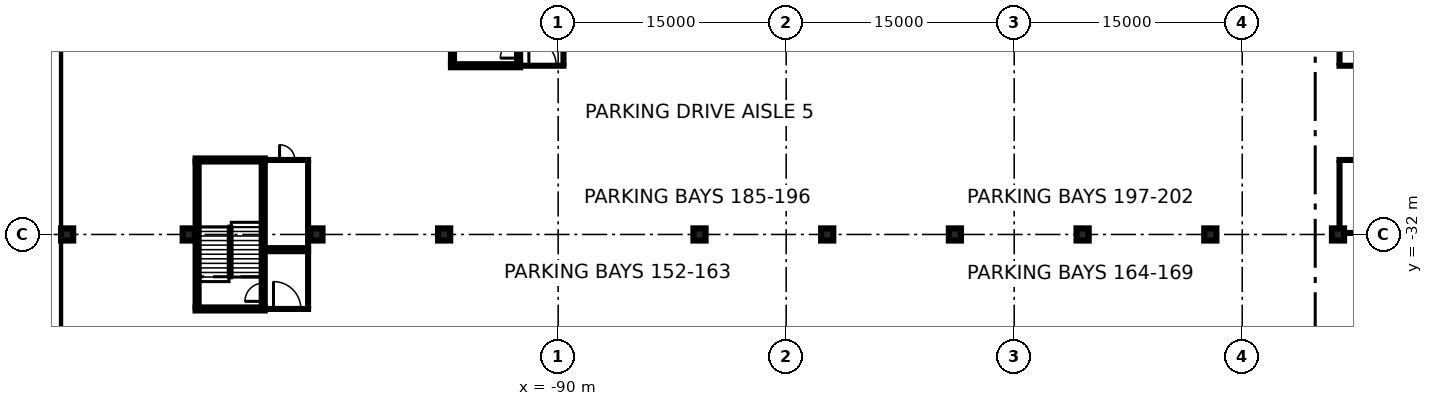
"""IFC4 building model, lengths in metres.
Left out: names, types, materials, properties, quantities, classifications, styles, units other than length and angle.
Written with IfcOpenShell. Run it as: python <this file> out.ifc"""

import sys

from ifc_helpers import new_model, si_unit, direction, frame, frame_2d, origin, origin_2d, place, context, subcontext, project, spatial, rectangle, extrude, element, fill, save


model = new_model("IFC4")
c1 = context("Model", 3, precision=1e-05, world=origin(), true_north=direction((0.0, 1.0)))
c2 = subcontext(c1, "Body", "Model", "MODEL_VIEW")
j1 = project(units=[si_unit("LENGTHUNIT", "METRE"), si_unit("PLANEANGLEUNIT", "RADIAN")], contexts=[c1])
p1 = place(None, origin())
s1 = spatial("IfcSite", under=j1, at=p1, CompositionType="ELEMENT")
p2 = place(p1, origin())
s2 = spatial("IfcBuilding", under=s1, at=p2, CompositionType="ELEMENT")
p3 = place(p2, frame((0.0, 0.0, -12.0)))
s3 = spatial("IfcBuildingStorey", under=s2, at=p3, CompositionType="ELEMENT", Elevation=-12.0)
p4 = place(p3, frame((-123.15, -80.0, 0.0), z_axis=(0.0, 0.0, 1.0), x_axis=(0.0, 1.0, 0.0)))
e1 = element("IfcWall", 1, at=p4, inside=s3, PredefinedType="USERDEFINED", context=c2, shape_type="SweptSolid", body=[
    extrude(rectangle(XDim=160.0, YDim=0.9, at=frame_2d((80.0, 0.0))), origin(), (0.0, 0.0, 1.0), 11.55),
])
p5 = place(p2, frame((0.0, 0.0, -3.6)))
s4 = spatial("IfcBuildingStorey", under=s2, at=p5, CompositionType="ELEMENT", Elevation=-3.6)
for number, where, z_axis, x_axis in (
    (2, (-122.3, -32.0, -0.4), (0.0, 0.0, 1.0), (1.0, 0.0, 0.0)),
    (3, (-114.3, -32.0, -0.4), (0.0, 0.0, 1.0), (1.0, 0.0, 0.0)),
    (4, (-105.9, -32.0, -0.4), (0.0, 0.0, 1.0), (1.0, 0.0, 0.0)),
    (5, (-97.5, -32.0, -0.4), (0.0, 0.0, 1.0), (1.0, 0.0, 0.0)),
    (6, (-80.7, -32.0, -0.4), (0.0, 0.0, 1.0), (1.0, 0.0, 0.0)),
    (7, (-72.3, -32.0, -0.4), (0.0, 0.0, 1.0), (1.0, 0.0, 0.0)),
    (8, (-63.9, -32.0, -0.4), (0.0, 0.0, 1.0), (1.0, 0.0, 0.0)),
    (9, (-55.5, -32.0, -0.4), (0.0, 0.0, 1.0), (1.0, 0.0, 0.0)),
    (10, (-47.1, -32.0, -0.4), (0.0, 0.0, 1.0), (1.0, 0.0, 0.0)),
    (11, (-38.7, -32.0, -0.4), (0.0, 0.0, 1.0), (1.0, 0.0, 0.0)),
):
    element("IfcColumn", number, at=place(p5, frame(where, z_axis=z_axis, x_axis=x_axis)), inside=s4, PredefinedType="COLUMN", context=c2, shape_type="SweptSolid", body=[
        extrude(rectangle(XDim=0.8, YDim=0.8, at=origin_2d()), origin(), (0.0, 0.0, 1.0), 3.55),
    ])
p6 = place(p5, frame((-38.7, -31.9, 0.0), z_axis=(0.0, 0.0, 1.0), x_axis=(1.0, 0.0, 0.0)))
e12 = element("IfcWall", 12, at=p6, inside=s4, PredefinedType="PARTITIONING", context=c2, shape_type="SweptSolid", body=[
    extrude(rectangle(XDim=17.6, YDim=0.2, at=frame_2d((8.8, 0.0))), origin(), (0.0, 0.0, 1.0), 3.15),
])
p7 = place(p5, frame((-38.7, -27.1, 0.0), z_axis=(0.0, 0.0, 1.0), x_axis=(1.0, 0.0, 0.0)))
e13 = element("IfcWall", 13, at=p7, inside=s4, PredefinedType="PARTITIONING", context=c2, shape_type="SweptSolid", body=[
    extrude(rectangle(XDim=17.6, YDim=0.2, at=frame_2d((8.8, 0.0))), origin(), (0.0, 0.0, 1.0), 3.15),
])
p8 = place(p7, frame((8.3, 0.0, 0.0)))
e14 = element("IfcOpeningElement", 14, at=p8, cuts=e13, PredefinedType="OPENING", context=c2, shape_type="SweptSolid", body=[
    extrude(rectangle(XDim=1.0, YDim=2.1, at=frame_2d((0.5, 1.05))), frame((0.0, 0.11, 0.0), z_axis=(0.0, -1.0, 0.0), x_axis=(1.0, 0.0, 0.0)), (0.0, 0.0, 1.0), 0.22),
])
p9 = place(p5, frame((-38.6, -31.6, 0.0), z_axis=(0.0, 0.0, 1.0), x_axis=(0.0, 1.0, 0.0)))
e15 = element("IfcWall", 15, at=p9, inside=s4, PredefinedType="PARTITIONING", context=c2, shape_type="SweptSolid", body=[
    extrude(rectangle(XDim=4.4, YDim=0.2, at=frame_2d((2.2, 0.0))), origin(), (0.0, 0.0, 1.0), 3.15),
])
p10 = place(p5, frame((-38.7, -20.9, 0.0), z_axis=(0.0, 0.0, 1.0), x_axis=(1.0, 0.0, 0.0)))
e16 = element("IfcWall", 16, at=p10, inside=s4, PredefinedType="PARTITIONING", context=c2, shape_type="SweptSolid", body=[
    extrude(rectangle(XDim=33.6, YDim=0.2, at=frame_2d((16.8, 0.0))), origin(), (0.0, 0.0, 1.0), 3.15),
])
p11 = place(p10, frame((15.9, 0.0, 0.0)))
e17 = element("IfcOpeningElement", 17, at=p11, cuts=e16, PredefinedType="OPENING", context=c2, shape_type="SweptSolid", body=[
    extrude(rectangle(XDim=1.8, YDim=2.1, at=frame_2d((0.9, 1.05))), frame((0.0, 0.11, 0.0), z_axis=(0.0, -1.0, 0.0), x_axis=(1.0, 0.0, 0.0)), (0.0, 0.0, 1.0), 0.22),
])
p12 = place(p5, frame((-38.6, -20.8, 0.0), z_axis=(0.0, 0.0, 1.0), x_axis=(0.0, 1.0, 0.0)))
e18 = element("IfcWall", 18, at=p12, inside=s4, PredefinedType="PARTITIONING", context=c2, shape_type="SweptSolid", body=[
    extrude(rectangle(XDim=4.2, YDim=0.2, at=frame_2d((2.1, 0.0))), origin(), (0.0, 0.0, 1.0), 3.15),
])
p13 = place(p5, frame((-109.3, -36.9, 0.0), z_axis=(0.0, 0.0, 1.0), x_axis=(1.0, 0.0, 0.0)))
e19 = element("IfcWall", 19, at=p13, inside=s4, PredefinedType="PARTITIONING", context=c2, shape_type="SweptSolid", body=[
    extrude(rectangle(XDim=2.95, YDim=0.2, at=frame_2d((1.475, 0.0))), origin(), (0.0, 0.0, 1.0), 3.15),
])
p14 = place(p13, frame((0.575, 0.0, 0.0)))
e20 = element("IfcOpeningElement", 20, at=p14, cuts=e19, PredefinedType="OPENING", context=c2, shape_type="SweptSolid", body=[
    extrude(rectangle(XDim=1.8, YDim=2.1, at=frame_2d((0.9, 1.05))), frame((0.0, 0.11, 0.0), z_axis=(0.0, -1.0, 0.0), x_axis=(1.0, 0.0, 0.0)), (0.0, 0.0, 1.0), 0.22),
])
p15 = place(p5, frame((-109.3, -33.1, 0.0), z_axis=(0.0, 0.0, 1.0), x_axis=(1.0, 0.0, 0.0)))
e21 = element("IfcWall", 21, at=p15, inside=s4, PredefinedType="PARTITIONING", context=c2, shape_type="SweptSolid", body=[
    extrude(rectangle(XDim=2.95, YDim=0.2, at=frame_2d((1.475, 0.0))), origin(), (0.0, 0.0, 1.0), 3.15),
])
p16 = place(p5, frame((-106.45, -36.8, 0.0), z_axis=(0.0, 0.0, 1.0), x_axis=(0.0, 1.0, 0.0)))
e22 = element("IfcWall", 22, at=p16, inside=s4, PredefinedType="PARTITIONING", context=c2, shape_type="SweptSolid", body=[
    extrude(rectangle(XDim=3.6, YDim=0.2, at=frame_2d((1.8, 0.0))), origin(), (0.0, 0.0, 1.0), 3.15),
])
p17 = place(p5, frame((-109.3, -32.9, 0.0), z_axis=(0.0, 0.0, 1.0), x_axis=(1.0, 0.0, 0.0)))
e23 = element("IfcWall", 23, at=p17, inside=s4, PredefinedType="PARTITIONING", context=c2, shape_type="SweptSolid", body=[
    extrude(rectangle(XDim=2.95, YDim=0.2, at=frame_2d((1.475, 0.0))), origin(), (0.0, 0.0, 1.0), 3.15),
])
p18 = place(p5, frame((-109.3, -27.1, 0.0), z_axis=(0.0, 0.0, 1.0), x_axis=(1.0, 0.0, 0.0)))
e24 = element("IfcWall", 24, at=p18, inside=s4, PredefinedType="PARTITIONING", context=c2, shape_type="SweptSolid", body=[
    extrude(rectangle(XDim=2.95, YDim=0.2, at=frame_2d((1.475, 0.0))), origin(), (0.0, 0.0, 1.0), 3.15),
])
p19 = place(p18, frame((0.975, 0.0, 0.0)))
e25 = element("IfcOpeningElement", 25, at=p19, cuts=e24, PredefinedType="OPENING", context=c2, shape_type="SweptSolid", body=[
    extrude(rectangle(XDim=1.0, YDim=2.1, at=frame_2d((0.5, 1.05))), frame((0.0, 0.11, 0.0), z_axis=(0.0, -1.0, 0.0), x_axis=(1.0, 0.0, 0.0)), (0.0, 0.0, 1.0), 0.22),
])
p20 = place(p5, frame((-106.45, -32.8, 0.0), z_axis=(0.0, 0.0, 1.0), x_axis=(0.0, 1.0, 0.0)))
e26 = element("IfcWall", 26, at=p20, inside=s4, PredefinedType="PARTITIONING", context=c2, shape_type="SweptSolid", body=[
    extrude(rectangle(XDim=5.6, YDim=0.2, at=frame_2d((2.8, 0.0))), origin(), (0.0, 0.0, 1.0), 3.15),
])
p21 = place(p5, frame((-92.5, -20.9, 0.0), z_axis=(0.0, 0.0, 1.0), x_axis=(1.0, 0.0, 0.0)))
e27 = element("IfcWall", 27, at=p21, inside=s4, PredefinedType="PARTITIONING", context=c2, shape_type="SweptSolid", body=[
    extrude(rectangle(XDim=2.95, YDim=0.2, at=frame_2d((1.475, 0.0))), origin(), (0.0, 0.0, 1.0), 3.15),
])
p22 = place(p21, frame((0.575, 0.0, 0.0)))
e28 = element("IfcOpeningElement", 28, at=p22, cuts=e27, PredefinedType="OPENING", context=c2, shape_type="SweptSolid", body=[
    extrude(rectangle(XDim=1.8, YDim=2.1, at=frame_2d((0.9, 1.05))), frame((0.0, 0.11, 0.0), z_axis=(0.0, -1.0, 0.0), x_axis=(1.0, 0.0, 0.0)), (0.0, 0.0, 1.0), 0.22),
])
p23 = place(p5, frame((-89.65, -20.8, 0.0), z_axis=(0.0, 0.0, 1.0), x_axis=(0.0, 1.0, 0.0)))
e29 = element("IfcWall", 29, at=p23, inside=s4, PredefinedType="PARTITIONING", context=c2, shape_type="SweptSolid", body=[
    extrude(rectangle(XDim=3.6, YDim=0.2, at=frame_2d((1.8, 0.0))), origin(), (0.0, 0.0, 1.0), 3.15),
])
p24 = place(p5, frame((-113.75, -36.8, 0.0), z_axis=(0.0, 0.0, 1.0), x_axis=(0.0, 1.0, 0.0)))
e30 = element("IfcWall", 30, at=p24, inside=s4, PredefinedType="SOLIDWALL", context=c2, shape_type="SweptSolid", body=[
    extrude(rectangle(XDim=9.6, YDim=0.2, at=frame_2d((4.8, 0.0))), origin(), (0.0, 0.0, 1.0), 3.15),
])
p25 = place(p5, frame((-109.4, -36.8, 0.0), z_axis=(0.0, 0.0, 1.0), x_axis=(0.0, 1.0, 0.0)))
e31 = element("IfcWall", 31, at=p25, inside=s4, PredefinedType="SOLIDWALL", context=c2, shape_type="SweptSolid", body=[
    extrude(rectangle(XDim=9.6, YDim=0.2, at=frame_2d((4.8, 0.0))), origin(), (0.0, 0.0, 1.0), 3.15),
])
p26 = place(p25, frame((0.4, 0.0, 0.0)))
e32 = element("IfcOpeningElement", 32, at=p26, cuts=e31, PredefinedType="OPENING", context=c2, shape_type="SweptSolid", body=[
    extrude(rectangle(XDim=1.2, YDim=2.1, at=frame_2d((0.6, 1.05))), frame((0.0, 0.11, 0.0), z_axis=(0.0, -1.0, 0.0), x_axis=(1.0, 0.0, 0.0)), (0.0, 0.0, 1.0), 0.22),
])
for number, where, z_axis, x_axis in (
    (33, (-109.3, -36.9, 0.0), (0.0, 0.0, 1.0), (-1.0, 0.0, 0.0)),
    (34, (-113.85, -27.1, 0.0), (0.0, 0.0, 1.0), (1.0, 0.0, 0.0)),
):
    element("IfcWall", number, at=place(p5, frame(where, z_axis=z_axis, x_axis=x_axis)), inside=s4, PredefinedType="SOLIDWALL", context=c2, shape_type="SweptSolid", body=[
        extrude(rectangle(XDim=4.55, YDim=0.2, at=frame_2d((2.275, 0.0))), origin(), (0.0, 0.0, 1.0), 3.15),
    ])
p27 = place(p5, frame((-96.95, -20.8, 0.0), z_axis=(0.0, 0.0, 1.0), x_axis=(0.0, 1.0, 0.0)))
e35 = element("IfcWall", 35, at=p27, inside=s4, PredefinedType="SOLIDWALL", context=c2, shape_type="SweptSolid", body=[
    extrude(rectangle(XDim=9.6, YDim=0.2, at=frame_2d((4.8, 0.0))), origin(), (0.0, 0.0, 1.0), 3.15),
])
p28 = place(p5, frame((-92.6, -20.8, 0.0), z_axis=(0.0, 0.0, 1.0), x_axis=(0.0, 1.0, 0.0)))
e36 = element("IfcWall", 36, at=p28, inside=s4, PredefinedType="SOLIDWALL", context=c2, shape_type="SweptSolid", body=[
    extrude(rectangle(XDim=9.6, YDim=0.2, at=frame_2d((4.8, 0.0))), origin(), (0.0, 0.0, 1.0), 3.15),
])
p29 = place(p28, frame((0.4, 0.0, 0.0)))
e37 = element("IfcOpeningElement", 37, at=p29, cuts=e36, PredefinedType="OPENING", context=c2, shape_type="SweptSolid", body=[
    extrude(rectangle(XDim=1.2, YDim=2.1, at=frame_2d((0.6, 1.05))), frame((0.0, 0.11, 0.0), z_axis=(0.0, -1.0, 0.0), x_axis=(1.0, 0.0, 0.0)), (0.0, 0.0, 1.0), 0.22),
])
p30 = place(p5, frame((-92.5, -20.9, 0.0), z_axis=(0.0, 0.0, 1.0), x_axis=(-1.0, 0.0, 0.0)))
e38 = element("IfcWall", 38, at=p30, inside=s4, PredefinedType="SOLIDWALL", context=c2, shape_type="SweptSolid", body=[
    extrude(rectangle(XDim=4.55, YDim=0.2, at=frame_2d((2.275, 0.0))), origin(), (0.0, 0.0, 1.0), 3.15),
])
p31 = place(p14, origin())
e39 = element("IfcDoor", 39, at=p31, inside=s4, OperationType="DOUBLE_DOOR_SINGLE_SWING", PredefinedType="DOOR", context=c2, shape_type="SweptSolid", body=[
    extrude(rectangle(XDim=1.8, YDim=2.1, at=frame_2d((0.9, 1.05))), frame((0.0, 0.025, 0.0), z_axis=(0.0, -1.0, 0.0), x_axis=(1.0, 0.0, 0.0)), (0.0, 0.0, 1.0), 0.05),
])
fill(e20, e39)
p32 = place(p19, origin())
e40 = element("IfcDoor", 40, at=p32, inside=s4, OperationType="SINGLE_SWING_LEFT", PredefinedType="DOOR", context=c2, shape_type="SweptSolid", body=[
    extrude(rectangle(XDim=1.0, YDim=2.1, at=frame_2d((0.5, 1.05))), frame((0.0, 0.025, 0.0), z_axis=(0.0, -1.0, 0.0), x_axis=(1.0, 0.0, 0.0)), (0.0, 0.0, 1.0), 0.05),
])
fill(e25, e40)
p33 = place(p22, origin())
e41 = element("IfcDoor", 41, at=p33, inside=s4, OperationType="DOUBLE_DOOR_SINGLE_SWING", PredefinedType="DOOR", context=c2, shape_type="SweptSolid", body=[
    extrude(rectangle(XDim=1.8, YDim=2.1, at=frame_2d((0.9, 1.05))), frame((0.0, 0.025, 0.0), z_axis=(0.0, -1.0, 0.0), x_axis=(1.0, 0.0, 0.0)), (0.0, 0.0, 1.0), 0.05),
])
fill(e28, e41)
p34 = place(p26, origin())
e42 = element("IfcDoor", 42, at=p34, inside=s4, OperationType="SINGLE_SWING_LEFT", PredefinedType="DOOR", context=c2, shape_type="SweptSolid", body=[
    extrude(rectangle(XDim=1.2, YDim=2.1, at=frame_2d((0.6, 1.05))), frame((0.0, 0.025, 0.0), z_axis=(0.0, -1.0, 0.0), x_axis=(1.0, 0.0, 0.0)), (0.0, 0.0, 1.0), 0.05),
])
fill(e32, e42)
p35 = place(p29, origin())
e43 = element("IfcDoor", 43, at=p35, inside=s4, OperationType="SINGLE_SWING_LEFT", PredefinedType="DOOR", context=c2, shape_type="SweptSolid", body=[
    extrude(rectangle(XDim=1.2, YDim=2.1, at=frame_2d((0.6, 1.05))), frame((0.0, 0.025, 0.0), z_axis=(0.0, -1.0, 0.0), x_axis=(1.0, 0.0, 0.0)), (0.0, 0.0, 1.0), 0.05),
])
fill(e37, e43)
save(model, sys.argv[1])
